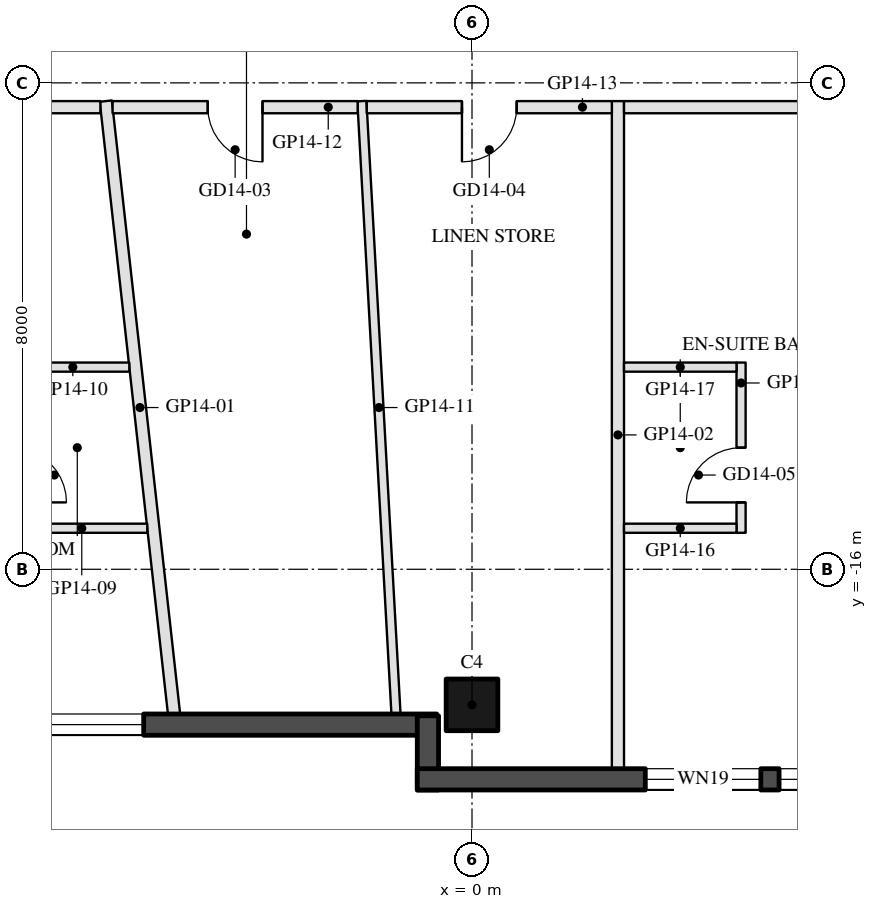
"""IFC4 building model, lengths in metres.
Left out: names, types, materials, properties, quantities, classifications, styles, units other than length and angle.
Written with IfcOpenShell. Run it as: python <this file> out.ifc"""

import sys

from ifc_helpers import new_model, si_unit, direction, frame, frame_2d, origin, origin_2d, place, context, subcontext, project, spatial, rectangle, hollow_rectangle, extrude, element, fill, save


model = new_model("IFC4")
c1 = context("Model", 3, precision=1e-05, world=origin(), true_north=direction((0.0, 1.0)))
c2 = subcontext(c1, "Body", "Model", "MODEL_VIEW")
j1 = project(units=[si_unit("LENGTHUNIT", "METRE"), si_unit("PLANEANGLEUNIT", "RADIAN")], contexts=[c1])
p1 = place(None, origin())
s1 = spatial("IfcSite", under=j1, at=p1, CompositionType="ELEMENT")
p2 = place(p1, origin())
s2 = spatial("IfcBuilding", under=s1, at=p2, CompositionType="ELEMENT")
p3 = place(p2, frame((0.0, 0.0, 165.1)))
s3 = spatial("IfcBuildingStorey", under=s2, at=p3, CompositionType="ELEMENT", Elevation=165.1)
p4 = place(p3, frame((0.0, -18.23, 0.0), z_axis=(0.0, 0.0, 1.0), x_axis=(-1.0, 0.0, 0.0)))
e1 = element("IfcColumn", 1, at=p4, inside=s3, PredefinedType="COLUMN", context=c2, shape_type="SweptSolid", body=[
    extrude(hollow_rectangle(XDim=0.85, YDim=0.85, WallThickness=0.04, at=origin_2d()), origin(), (0.0, 0.0, 1.0), 3.7),
])
p5 = place(p3, frame((-7.32, -18.555, 0.0), z_axis=(0.0, 0.0, 1.0), x_axis=(1.0, 0.0, 0.0)))
e2 = element("IfcWall", 2, at=p5, inside=s3, PredefinedType="SOLIDWALL", context=c2, shape_type="SweptSolid", body=[
    extrude(rectangle(XDim=6.74, YDim=0.35, at=frame_2d((3.37, 0.0))), origin(), (0.0, 0.0, 1.0), 3.55),
])
p6 = place(p5, frame((0.32, 0.0, 0.3)))
e3 = element("IfcOpeningElement", 3, at=p6, cuts=e2, PredefinedType="OPENING", context=c2, shape_type="SweptSolid", body=[
    extrude(rectangle(XDim=1.6, YDim=2.65, at=frame_2d((0.8, 1.325))), frame((0.0, 0.185, 0.0), z_axis=(0.0, -1.0, 0.0), x_axis=(1.0, 0.0, 0.0)), (0.0, 0.0, 1.0), 0.37),
])
p7 = place(p3, frame((-0.725, -18.41, 0.0), z_axis=(0.0, 0.0, 1.0), x_axis=(0.0, -1.0, 0.0)))
e4 = element("IfcWall", 4, at=p7, inside=s3, PredefinedType="SOLIDWALL", context=c2, shape_type="SweptSolid", body=[
    extrude(rectangle(XDim=1.22, YDim=0.35, at=frame_2d((0.61, 0.0))), origin(), (0.0, 0.0, 1.0), 3.55),
])
p8 = place(p3, frame((-0.9, -19.455, 0.0), z_axis=(0.0, 0.0, 1.0), x_axis=(1.0, 0.0, 0.0)))
e5 = element("IfcWall", 5, at=p8, inside=s3, PredefinedType="SOLIDWALL", context=c2, shape_type="SweptSolid", body=[
    extrude(rectangle(XDim=9.7, YDim=0.35, at=frame_2d((4.85, 0.0))), origin(), (0.0, 0.0, 1.0), 3.55),
])
p9 = place(p8, frame((3.75, 0.0, 0.3)))
e6 = element("IfcOpeningElement", 6, at=p9, cuts=e5, PredefinedType="OPENING", context=c2, shape_type="SweptSolid", body=[
    extrude(rectangle(XDim=1.9, YDim=2.65, at=frame_2d((0.95, 1.325))), frame((0.0, 0.185, 0.0), z_axis=(0.0, -1.0, 0.0), x_axis=(1.0, 0.0, 0.0)), (0.0, 0.0, 1.0), 0.37),
])
p10 = place(p8, frame((5.95, 0.0, 0.3)))
e7 = element("IfcOpeningElement", 7, at=p10, cuts=e5, PredefinedType="OPENING", context=c2, shape_type="SweptSolid", body=[
    extrude(rectangle(XDim=1.9, YDim=2.65, at=frame_2d((0.95, 1.325))), frame((0.0, 0.185, 0.0), z_axis=(0.0, -1.0, 0.0), x_axis=(1.0, 0.0, 0.0)), (0.0, 0.0, 1.0), 0.37),
])
p11 = place(p3, frame((-4.9, -18.38, 0.0), z_axis=(0.0, 0.0, 1.0), x_axis=(-0.110634961609, 0.993861109648, 0.0)))
e8 = element("IfcWall", 8, at=p11, inside=s3, PredefinedType="PARTITIONING", context=c2, shape_type="SweptSolid", body=[
    extrude(rectangle(XDim=10.142, YDim=0.2, at=frame_2d((5.071, 0.0))), origin(), (0.0, 0.0, 1.0), 3.06),
])
p12 = place(p3, frame((2.4, -19.28, 0.0), z_axis=(0.0, 0.0, 1.0), x_axis=(0.0, 1.0, 0.0)))
e9 = element("IfcWall", 9, at=p12, inside=s3, PredefinedType="PARTITIONING", context=c2, shape_type="SweptSolid", body=[
    extrude(rectangle(XDim=10.98, YDim=0.2, at=frame_2d((5.49, 0.0))), origin(), (0.0, 0.0, 1.0), 3.06),
])
p13 = place(p3, frame((-6.112, -8.4, 0.0), z_axis=(0.0, 0.0, 1.0), x_axis=(-1.0, 0.0, 0.0)))
e10 = element("IfcWall", 10, at=p13, inside=s3, PredefinedType="PARTITIONING", context=c2, shape_type="SweptSolid", body=[
    extrude(rectangle(XDim=3.876, YDim=0.2, at=frame_2d((1.938, 0.0))), origin(), (0.0, 0.0, 1.0), 2.95),
])
p14 = place(p13, frame((1.438, 0.0, 0.0)))
e11 = element("IfcOpeningElement", 11, at=p14, cuts=e10, PredefinedType="OPENING", context=c2, shape_type="SweptSolid", body=[
    extrude(rectangle(XDim=1.0, YDim=2.1, at=frame_2d((0.5, 1.05))), frame((0.0, 0.11, 0.0), z_axis=(0.0, -1.0, 0.0), x_axis=(1.0, 0.0, 0.0)), (0.0, 0.0, 1.0), 0.22),
])
p15 = place(p3, frame((-7.494, -15.325, 0.0), z_axis=(0.0, 0.0, 1.0), x_axis=(1.0, 0.0, 0.0)))
e12 = element("IfcWall", 12, at=p15, inside=s3, PredefinedType="PARTITIONING", context=c2, shape_type="SweptSolid", body=[
    extrude(rectangle(XDim=2.153, YDim=0.15, at=frame_2d((1.077, 0.0))), origin(), (0.0, 0.0, 1.0), 3.55),
])
p16 = place(p3, frame((-7.494, -12.675, 0.0), z_axis=(0.0, 0.0, 1.0), x_axis=(1.0, 0.0, 0.0)))
e13 = element("IfcWall", 13, at=p16, inside=s3, PredefinedType="PARTITIONING", context=c2, shape_type="SweptSolid", body=[
    extrude(rectangle(XDim=1.858, YDim=0.15, at=frame_2d((0.929, 0.0))), origin(), (0.0, 0.0, 1.0), 3.55),
])
p17 = place(p3, frame((-1.25, -18.38, 0.0), z_axis=(0.0, 0.0, 1.0), x_axis=(-0.055573151667, 0.998454618305, 0.0)))
e14 = element("IfcWall", 14, at=p17, inside=s3, PredefinedType="PARTITIONING", context=c2, shape_type="SweptSolid", body=[
    extrude(rectangle(XDim=10.095, YDim=0.15, at=frame_2d((5.048, 0.0))), origin(), (0.0, 0.0, 1.0), 3.06),
])
p18 = place(p3, frame((-1.881, -8.4, 0.0), z_axis=(0.0, 0.0, 1.0), x_axis=(-1.0, 0.0, 0.0)))
e15 = element("IfcWall", 15, at=p18, inside=s3, PredefinedType="PARTITIONING", context=c2, shape_type="SweptSolid", body=[
    extrude(rectangle(XDim=4.03, YDim=0.2, at=frame_2d((2.015, 0.0))), origin(), (0.0, 0.0, 1.0), 2.95),
])
p19 = place(p18, frame((1.565, 0.0, 0.0)))
e16 = element("IfcOpeningElement", 16, at=p19, cuts=e15, PredefinedType="OPENING", context=c2, shape_type="SweptSolid", body=[
    extrude(rectangle(XDim=0.9, YDim=2.1, at=frame_2d((0.45, 1.05))), frame((0.0, 0.11, 0.0), z_axis=(0.0, -1.0, 0.0), x_axis=(1.0, 0.0, 0.0)), (0.0, 0.0, 1.0), 0.22),
])
p20 = place(p3, frame((2.3, -8.4, 0.0), z_axis=(0.0, 0.0, 1.0), x_axis=(-1.0, 0.0, 0.0)))
e17 = element("IfcWall", 17, at=p20, inside=s3, PredefinedType="PARTITIONING", context=c2, shape_type="SweptSolid", body=[
    extrude(rectangle(XDim=4.031, YDim=0.2, at=frame_2d((2.015, 0.0))), origin(), (0.0, 0.0, 1.0), 2.95),
])
p21 = place(p20, frame((1.565, 0.0, 0.0)))
e18 = element("IfcOpeningElement", 18, at=p21, cuts=e17, PredefinedType="OPENING", context=c2, shape_type="SweptSolid", body=[
    extrude(rectangle(XDim=0.9, YDim=2.1, at=frame_2d((0.45, 1.05))), frame((0.0, 0.11, 0.0), z_axis=(0.0, -1.0, 0.0), x_axis=(1.0, 0.0, 0.0)), (0.0, 0.0, 1.0), 0.22),
])
p22 = place(p3, frame((9.988, -8.4, 0.0), z_axis=(0.0, 0.0, 1.0), x_axis=(-1.0, 0.0, 0.0)))
e19 = element("IfcWall", 19, at=p22, inside=s3, PredefinedType="PARTITIONING", context=c2, shape_type="SweptSolid", body=[
    extrude(rectangle(XDim=7.488, YDim=0.2, at=frame_2d((3.744, 0.0))), origin(), (0.0, 0.0, 1.0), 2.95),
])
p23 = place(p22, frame((3.244, 0.0, 0.0)))
e20 = element("IfcOpeningElement", 20, at=p23, cuts=e19, PredefinedType="OPENING", context=c2, shape_type="SweptSolid", body=[
    extrude(rectangle(XDim=1.0, YDim=2.1, at=frame_2d((0.5, 1.05))), frame((0.0, 0.11, 0.0), z_axis=(0.0, -1.0, 0.0), x_axis=(1.0, 0.0, 0.0)), (0.0, 0.0, 1.0), 0.22),
])
p24 = place(p3, frame((4.425, -15.4, 0.0), z_axis=(0.0, 0.0, 1.0), x_axis=(0.0, 1.0, 0.0)))
e21 = element("IfcWall", 21, at=p24, inside=s3, PredefinedType="PARTITIONING", context=c2, shape_type="SweptSolid", body=[
    extrude(rectangle(XDim=2.8, YDim=0.15, at=frame_2d((1.4, 0.0))), origin(), (0.0, 0.0, 1.0), 3.55),
])
p25 = place(p24, frame((0.5, 0.0, 0.0)))
e22 = element("IfcOpeningElement", 22, at=p25, cuts=e21, PredefinedType="OPENING", context=c2, shape_type="SweptSolid", body=[
    extrude(rectangle(XDim=0.9, YDim=2.1, at=frame_2d((0.45, 1.05))), frame((0.0, 0.085, 0.0), z_axis=(0.0, -1.0, 0.0), x_axis=(1.0, 0.0, 0.0)), (0.0, 0.0, 1.0), 0.17),
])
for number, where, z_axis, x_axis in (
    (23, (2.5, -15.325, 0.0), (0.0, 0.0, 1.0), (1.0, 0.0, 0.0)),
    (24, (2.5, -12.675, 0.0), (0.0, 0.0, 1.0), (1.0, 0.0, 0.0)),
):
    element("IfcWall", number, at=place(p3, frame(where, z_axis=z_axis, x_axis=x_axis)), inside=s3, PredefinedType="PARTITIONING", context=c2, shape_type="SweptSolid", body=[
        extrude(rectangle(XDim=1.85, YDim=0.15, at=frame_2d((0.925, 0.0))), origin(), (0.0, 0.0, 1.0), 2.95),
    ])
p26 = place(p6, origin())
e25 = element("IfcWindow", 25, at=p26, inside=s3, PartitioningType="SINGLE_PANEL", PredefinedType="WINDOW", context=c2, shape_type="SweptSolid", body=[
    extrude(rectangle(XDim=1.6, YDim=2.65, at=frame_2d((0.8, 1.325))), frame((0.0, 0.03, 0.0), z_axis=(0.0, -1.0, 0.0), x_axis=(1.0, 0.0, 0.0)), (0.0, 0.0, 1.0), 0.06),
])
fill(e3, e25)
p27 = place(p9, origin())
e26 = element("IfcWindow", 26, at=p27, inside=s3, PartitioningType="SINGLE_PANEL", PredefinedType="WINDOW", context=c2, shape_type="SweptSolid", body=[
    extrude(rectangle(XDim=1.9, YDim=2.65, at=frame_2d((0.95, 1.325))), frame((0.0, 0.03, 0.0), z_axis=(0.0, -1.0, 0.0), x_axis=(1.0, 0.0, 0.0)), (0.0, 0.0, 1.0), 0.06),
])
fill(e6, e26)
p28 = place(p10, origin())
e27 = element("IfcWindow", 27, at=p28, inside=s3, PartitioningType="SINGLE_PANEL", PredefinedType="WINDOW", context=c2, shape_type="SweptSolid", body=[
    extrude(rectangle(XDim=1.9, YDim=2.65, at=frame_2d((0.95, 1.325))), frame((0.0, 0.03, 0.0), z_axis=(0.0, -1.0, 0.0), x_axis=(1.0, 0.0, 0.0)), (0.0, 0.0, 1.0), 0.06),
])
fill(e7, e27)
p29 = place(p19, origin())
e28 = element("IfcDoor", 28, at=p29, inside=s3, OperationType="SINGLE_SWING_LEFT", PredefinedType="DOOR", context=c2, shape_type="SweptSolid", body=[
    extrude(rectangle(XDim=0.9, YDim=2.1, at=frame_2d((0.45, 1.05))), frame((0.0, 0.025, 0.0), z_axis=(0.0, -1.0, 0.0), x_axis=(1.0, 0.0, 0.0)), (0.0, 0.0, 1.0), 0.05),
])
fill(e16, e28)
p30 = place(p21, origin())
e29 = element("IfcDoor", 29, at=p30, inside=s3, OperationType="SINGLE_SWING_RIGHT", PredefinedType="DOOR", context=c2, shape_type="SweptSolid", body=[
    extrude(rectangle(XDim=0.9, YDim=2.1, at=frame_2d((0.45, 1.05))), frame((0.0, 0.025, 0.0), z_axis=(0.0, -1.0, 0.0), x_axis=(1.0, 0.0, 0.0)), (0.0, 0.0, 1.0), 0.05),
])
fill(e18, e29)
p31 = place(p25, origin())
e30 = element("IfcDoor", 30, at=p31, inside=s3, OperationType="SINGLE_SWING_LEFT", PredefinedType="DOOR", context=c2, shape_type="SweptSolid", body=[
    extrude(rectangle(XDim=0.9, YDim=2.1, at=frame_2d((0.45, 1.05))), frame((0.0, 0.025, 0.0), z_axis=(0.0, -1.0, 0.0), x_axis=(1.0, 0.0, 0.0)), (0.0, 0.0, 1.0), 0.05),
])
fill(e22, e30)
save(model, sys.argv[1])
